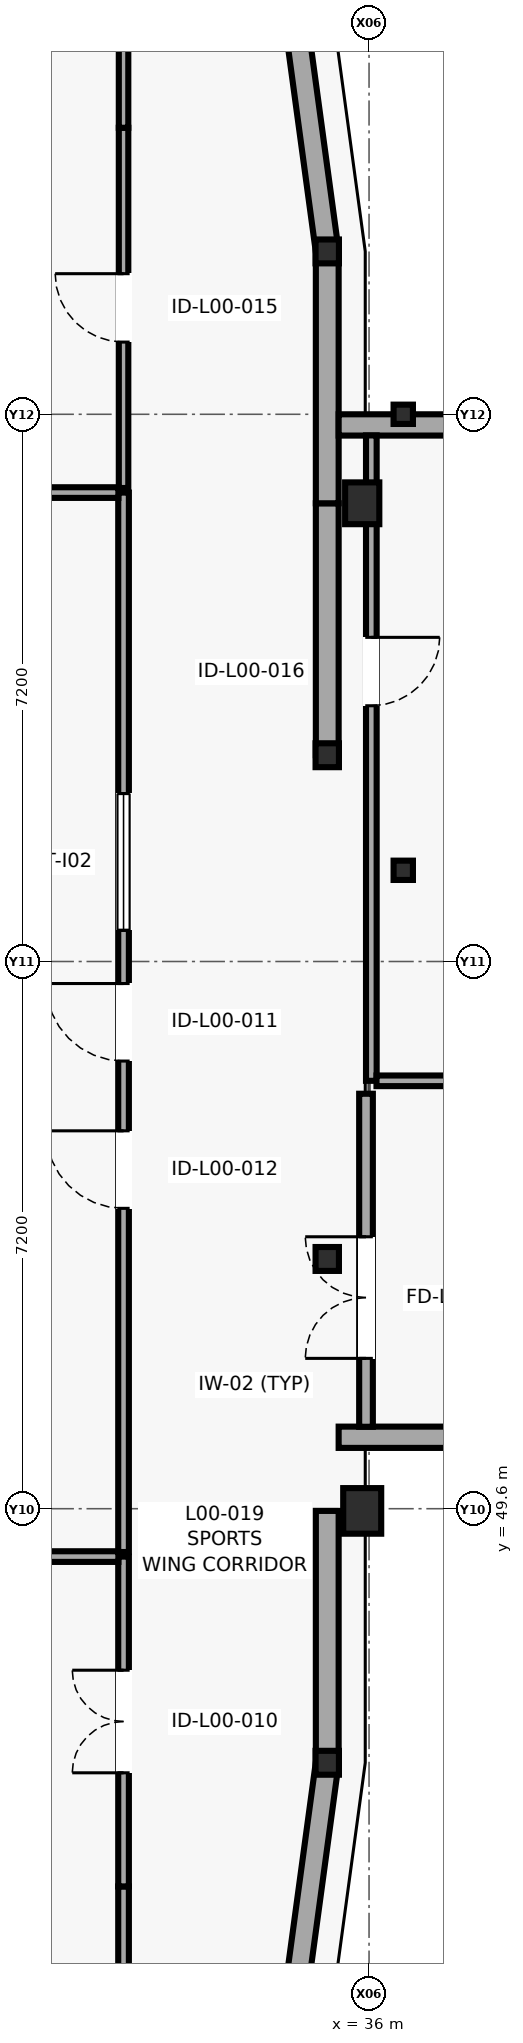
"""IFC4 building model, lengths in metres.
Left out: names, types, materials, properties, quantities, classifications, styles, units other than length and angle.
Written with IfcOpenShell. Run it as: python <this file> out.ifc"""

import sys

from ifc_helpers import new_model, si_unit, direction, frame, frame_2d, origin, origin_2d, place, context, subcontext, project, spatial, rectangle, i_section, extrude, element, fill, save


model = new_model("IFC4")
c1 = context("Model", 3, precision=1e-05, world=origin(), true_north=direction((0.0, 1.0)))
c2 = subcontext(c1, "Body", "Model", "MODEL_VIEW")
j1 = project(units=[si_unit("LENGTHUNIT", "METRE"), si_unit("PLANEANGLEUNIT", "RADIAN")], contexts=[c1])
p1 = place(None, origin())
s1 = spatial("IfcSite", under=j1, at=p1, CompositionType="ELEMENT")
p2 = place(p1, origin())
s2 = spatial("IfcBuilding", under=s1, at=p2, CompositionType="ELEMENT")
p3 = place(p2, origin())
s3 = spatial("IfcBuildingStorey", under=s2, at=p3, CompositionType="ELEMENT", Elevation=0.0)
for number, where, z_axis, x_axis in (
    (1, (35.45, 46.257, 0.0), (0.0, 0.0, 1.0), (1.0, 0.0, 0.0)),
    (2, (35.45, 52.886, 0.0), (0.0, 0.0, 1.0), (1.0, 0.0, 0.0)),
    (3, (35.45, 59.514, 0.0), (0.0, 0.0, 1.0), (1.0, 0.0, 0.0)),
    (4, (35.45, 66.143, 0.0), (0.0, 0.0, 1.0), (1.0, 0.0, 0.0)),
):
    element("IfcColumn", number, at=place(p3, frame(where, z_axis=z_axis, x_axis=x_axis)), inside=s3, PredefinedType="COLUMN", context=c2, shape_type="SweptSolid", body=[
        extrude(i_section(OverallWidth=0.307, OverallDepth=0.314, WebThickness=0.012, FlangeThickness=0.019, FilletRadius=0.015, at=origin_2d()), origin(), (0.0, 0.0, 1.0), 4.2),
    ])
p4 = place(p3, frame((35.91, 49.571, 0.0), z_axis=(0.0, 0.0, 1.0), x_axis=(1.0, 0.0, 0.0)))
e5 = element("IfcColumn", 5, at=p4, inside=s3, PredefinedType="PILASTER", context=c2, shape_type="SweptSolid", body=[
    extrude(rectangle(XDim=0.5, YDim=0.6, at=origin_2d()), origin(), (0.0, 0.0, 1.0), 4.2),
])
p5 = place(p3, frame((35.91, 62.829, 0.0), z_axis=(0.0, 0.0, 1.0), x_axis=(1.0, 0.0, 0.0)))
e6 = element("IfcColumn", 6, at=p5, inside=s3, PredefinedType="PILASTER", context=c2, shape_type="SweptSolid", body=[
    extrude(rectangle(XDim=0.45, YDim=0.55, at=origin_2d()), origin(), (0.0, 0.0, 1.0), 4.2),
])
for number, where, z_axis, x_axis in (
    (7, (36.45, 58.0, 0.0), (0.0, 0.0, 1.0), (1.0, 0.0, 0.0)),
    (8, (36.45, 64.0, 0.0), (0.0, 0.0, 1.0), (1.0, 0.0, 0.0)),
):
    element("IfcColumn", number, at=place(p3, frame(where, z_axis=z_axis, x_axis=x_axis)), inside=s3, PredefinedType="COLUMN", context=c2, shape_type="SweptSolid", body=[
        extrude(i_section(OverallWidth=0.255, OverallDepth=0.254, WebThickness=0.009, FlangeThickness=0.014, FilletRadius=0.013, at=origin_2d()), origin(), (0.0, 0.0, 1.0), 4.2),
    ])
p6 = place(p3, frame((35.0, 42.943, 0.0), z_axis=(0.0, 0.0, 1.0), x_axis=(0.134539839792, 0.990908185206, 0.0)))
e9 = element("IfcWall", 9, at=p6, inside=s3, PredefinedType="SOLIDWALL", context=c2, shape_type="SweptSolid", body=[
    extrude(rectangle(XDim=3.344, YDim=0.3, at=frame_2d((1.672, 0.0))), origin(), (0.0, 0.0, 1.0), 3.68),
])
p7 = place(p3, frame((35.45, 46.257, 0.0), z_axis=(0.0, 0.0, 1.0), x_axis=(0.0, 1.0, 0.0)))
e10 = element("IfcWall", 10, at=p7, inside=s3, PredefinedType="SOLIDWALL", context=c2, shape_type="SweptSolid", body=[
    extrude(rectangle(XDim=3.314, YDim=0.3, at=frame_2d((1.657, 0.0))), origin(), (0.0, 0.0, 1.0), 3.68),
])
p8 = place(p3, frame((35.45, 59.514, 0.0), z_axis=(0.0, 0.0, 1.0), x_axis=(0.0, 1.0, 0.0)))
e11 = element("IfcWall", 11, at=p8, inside=s3, PredefinedType="SOLIDWALL", context=c2, shape_type="SweptSolid", body=[
    extrude(rectangle(XDim=3.315, YDim=0.3, at=frame_2d((1.658, 0.0))), origin(), (0.0, 0.0, 1.0), 3.68),
])
p9 = place(p3, frame((35.45, 62.829, 0.0), z_axis=(0.0, 0.0, 1.0), x_axis=(0.0, 1.0, 0.0)))
e12 = element("IfcWall", 12, at=p9, inside=s3, PredefinedType="SOLIDWALL", context=c2, shape_type="SweptSolid", body=[
    extrude(rectangle(XDim=3.314, YDim=0.3, at=frame_2d((1.657, 0.0))), origin(), (0.0, 0.0, 1.0), 3.68),
])
p10 = place(p3, frame((35.45, 66.143, 0.0), z_axis=(0.0, 0.0, 1.0), x_axis=(-0.134539839792, 0.990908185206, 0.0)))
e13 = element("IfcWall", 13, at=p10, inside=s3, PredefinedType="SOLIDWALL", context=c2, shape_type="SweptSolid", body=[
    extrude(rectangle(XDim=3.344, YDim=0.3, at=frame_2d((1.672, 0.0))), origin(), (0.0, 0.0, 1.0), 3.68),
])
p11 = place(p3, frame((43.48, 63.86, 0.0), z_axis=(0.0, 0.0, 1.0), x_axis=(-1.0, 0.0, 0.0)))
e14 = element("IfcWall", 14, at=p11, inside=s3, PredefinedType="SOLIDWALL", context=c2, shape_type="SweptSolid", body=[
    extrude(rectangle(XDim=7.88, YDim=0.28, at=frame_2d((3.94, 0.0))), origin(), (0.0, 0.0, 1.0), 3.075),
])
p12 = place(p11, frame((1.12, 0.0, 0.85)))
e15 = element("IfcOpeningElement", 15, at=p12, cuts=e14, PredefinedType="OPENING", context=c2, shape_type="SweptSolid", body=[
    extrude(rectangle(XDim=1.7, YDim=1.75, at=frame_2d((0.85, 0.875))), frame((0.0, 0.15, 0.0), z_axis=(0.0, -1.0, 0.0), x_axis=(1.0, 0.0, 0.0)), (0.0, 0.0, 1.0), 0.3),
])
p13 = place(p11, frame((4.51, 0.0, 0.85)))
e16 = element("IfcOpeningElement", 16, at=p13, cuts=e14, PredefinedType="OPENING", context=c2, shape_type="SweptSolid", body=[
    extrude(rectangle(XDim=1.9, YDim=1.65, at=frame_2d((0.95, 0.825))), frame((0.0, 0.15, 0.0), z_axis=(0.0, -1.0, 0.0), x_axis=(1.0, 0.0, 0.0)), (0.0, 0.0, 1.0), 0.3),
])
p14 = place(p3, frame((35.6, 50.54, 0.0), z_axis=(0.0, 0.0, 1.0), x_axis=(1.0, 0.0, 0.0)))
e17 = element("IfcWall", 17, at=p14, inside=s3, PredefinedType="SOLIDWALL", context=c2, shape_type="SweptSolid", body=[
    extrude(rectangle(XDim=7.88, YDim=0.28, at=frame_2d((3.94, 0.0))), origin(), (0.0, 0.0, 1.0), 3.98),
])
p15 = place(p14, frame((3.25, 0.0, 0.0)))
e18 = element("IfcOpeningElement", 18, at=p15, cuts=e17, PredefinedType="OPENING", context=c2, shape_type="SweptSolid", body=[
    extrude(rectangle(XDim=1.5, YDim=2.2, at=frame_2d((0.75, 1.1))), frame((0.0, 0.15, 0.0), z_axis=(0.0, -1.0, 0.0), x_axis=(1.0, 0.0, 0.0)), (0.0, 0.0, 1.0), 0.3),
])
p16 = place(p14, frame((1.42, 0.0, 0.75)))
e19 = element("IfcOpeningElement", 19, at=p16, cuts=e17, PredefinedType="OPENING", context=c2, shape_type="SweptSolid", body=[
    extrude(rectangle(XDim=1.1, YDim=2.1, at=frame_2d((0.55, 1.05))), frame((0.0, 0.15, 0.0), z_axis=(0.0, -1.0, 0.0), x_axis=(1.0, 0.0, 0.0)), (0.0, 0.0, 1.0), 0.3),
])
p17 = place(p14, frame((5.36, 0.0, 0.75)))
e20 = element("IfcOpeningElement", 20, at=p17, cuts=e17, PredefinedType="OPENING", context=c2, shape_type="SweptSolid", body=[
    extrude(rectangle(XDim=1.1, YDim=2.1, at=frame_2d((0.55, 1.05))), frame((0.0, 0.15, 0.0), z_axis=(0.0, -1.0, 0.0), x_axis=(1.0, 0.0, 0.0)), (0.0, 0.0, 1.0), 0.3),
])
p18 = place(p3, frame((35.96, 50.678, 0.0), z_axis=(0.0, 0.0, 1.0), x_axis=(0.0, 1.0, 0.0)))
e21 = element("IfcWall", 21, at=p18, inside=s3, PredefinedType="PARTITIONING", context=c2, shape_type="SweptSolid", body=[
    extrude(rectangle(XDim=4.382, YDim=0.18, at=frame_2d((2.191, 0.0))), origin(), (0.0, 0.0, 1.0), 3.98),
])
p19 = place(p18, frame((0.9, 0.0, 0.0)))
e22 = element("IfcOpeningElement", 22, at=p19, cuts=e21, PredefinedType="OPENING", context=c2, shape_type="SweptSolid", body=[
    extrude(rectangle(XDim=1.6, YDim=2.25, at=frame_2d((0.8, 1.125))), frame((0.0, 0.1, 0.0), z_axis=(0.0, -1.0, 0.0), x_axis=(1.0, 0.0, 0.0)), (0.0, 0.0, 1.0), 0.2),
])
p20 = place(p3, frame((32.77, 35.966, 0.0), z_axis=(0.0, 0.0, 1.0), x_axis=(0.0, 1.0, 0.0)))
e23 = element("IfcWall", 23, at=p20, inside=s3, PredefinedType="PARTITIONING", context=c2, shape_type="SweptSolid", body=[
    extrude(rectangle(XDim=8.664, YDim=0.14, at=frame_2d((4.332, 0.0))), origin(), (0.0, 0.0, 1.0), 3.93),
])
p21 = place(p3, frame((32.77, 44.63, 0.0), z_axis=(0.0, 0.0, 1.0), x_axis=(0.0, 1.0, 0.0)))
e24 = element("IfcWall", 24, at=p21, inside=s3, PredefinedType="PARTITIONING", context=c2, shape_type="SweptSolid", body=[
    extrude(rectangle(XDim=4.34, YDim=0.14, at=frame_2d((2.17, 0.0))), origin(), (0.0, 0.0, 1.0), 3.93),
])
p22 = place(p21, frame((1.495, 0.0, 0.0)))
e25 = element("IfcOpeningElement", 25, at=p22, cuts=e24, PredefinedType="OPENING", context=c2, shape_type="SweptSolid", body=[
    extrude(rectangle(XDim=1.35, YDim=2.25, at=frame_2d((0.675, 1.125))), frame((0.0, 0.08, 0.0), z_axis=(0.0, -1.0, 0.0), x_axis=(1.0, 0.0, 0.0)), (0.0, 0.0, 1.0), 0.16),
])
p23 = place(p3, frame((32.702, 48.97, 0.0), z_axis=(0.0, 0.0, 1.0), x_axis=(-1.0, 0.0, 0.0)))
e26 = element("IfcWall", 26, at=p23, inside=s3, PredefinedType="PARTITIONING", context=c2, shape_type="SweptSolid", body=[
    extrude(rectangle(XDim=29.481, YDim=0.14, at=frame_2d((14.74, 0.0))), origin(), (0.0, 0.0, 1.0), 3.93),
])
p24 = place(p3, frame((32.77, 49.03, 0.0), z_axis=(0.0, 0.0, 1.0), x_axis=(0.0, 1.0, 0.0)))
e27 = element("IfcWall", 27, at=p24, inside=s3, PredefinedType="PARTITIONING", context=c2, shape_type="SweptSolid", body=[
    extrude(rectangle(XDim=13.94, YDim=0.14, at=frame_2d((6.97, 0.0))), origin(), (0.0, 0.0, 1.0), 3.93),
])
p25 = place(p24, frame((6.46, 0.0, 0.0)))
e28 = element("IfcOpeningElement", 28, at=p25, cuts=e27, PredefinedType="OPENING", context=c2, shape_type="SweptSolid", body=[
    extrude(rectangle(XDim=1.02, YDim=2.14, at=frame_2d((0.51, 1.07))), frame((0.0, 0.08, 0.0), z_axis=(0.0, -1.0, 0.0), x_axis=(1.0, 0.0, 0.0)), (0.0, 0.0, 1.0), 0.16),
])
p26 = place(p24, frame((4.522, 0.0, 0.0)))
e29 = element("IfcOpeningElement", 29, at=p26, cuts=e27, PredefinedType="OPENING", context=c2, shape_type="SweptSolid", body=[
    extrude(rectangle(XDim=1.02, YDim=2.14, at=frame_2d((0.51, 1.07))), frame((0.0, 0.08, 0.0), z_axis=(0.0, -1.0, 0.0), x_axis=(1.0, 0.0, 0.0)), (0.0, 0.0, 1.0), 0.16),
])
p27 = place(p24, frame((8.18, 0.0, 1.05)))
e30 = element("IfcOpeningElement", 30, at=p27, cuts=e27, PredefinedType="OPENING", context=c2, shape_type="SweptSolid", body=[
    extrude(rectangle(XDim=1.8, YDim=1.2, at=frame_2d((0.9, 0.6))), frame((0.0, 0.08, 0.0), z_axis=(0.0, -1.0, 0.0), x_axis=(1.0, 0.0, 0.0)), (0.0, 0.0, 1.0), 0.16),
])
p28 = place(p3, frame((32.702, 62.97, 0.0), z_axis=(0.0, 0.0, 1.0), x_axis=(-1.0, 0.0, 0.0)))
e31 = element("IfcWall", 31, at=p28, inside=s3, PredefinedType="PARTITIONING", context=c2, shape_type="SweptSolid", body=[
    extrude(rectangle(XDim=29.555, YDim=0.14, at=frame_2d((14.777, 0.0))), origin(), (0.0, 0.0, 1.0), 3.93),
])
p29 = place(p28, frame((14.328, 0.0, 0.0)))
e32 = element("IfcOpeningElement", 32, at=p29, cuts=e31, PredefinedType="OPENING", context=c2, shape_type="SweptSolid", body=[
    extrude(rectangle(XDim=0.9, YDim=2.1, at=frame_2d((0.45, 1.05))), frame((0.0, 0.08, 0.0), z_axis=(0.0, -1.0, 0.0), x_axis=(1.0, 0.0, 0.0)), (0.0, 0.0, 1.0), 0.16),
])
p30 = place(p28, frame((10.029, 0.0, 0.0)))
e33 = element("IfcOpeningElement", 33, at=p30, cuts=e31, PredefinedType="OPENING", context=c2, shape_type="SweptSolid", body=[
    extrude(rectangle(XDim=0.9, YDim=2.1, at=frame_2d((0.45, 1.05))), frame((0.0, 0.08, 0.0), z_axis=(0.0, -1.0, 0.0), x_axis=(1.0, 0.0, 0.0)), (0.0, 0.0, 1.0), 0.16),
])
p31 = place(p28, frame((15.928, 0.0, 1.05)))
e34 = element("IfcOpeningElement", 34, at=p31, cuts=e31, PredefinedType="OPENING", context=c2, shape_type="SweptSolid", body=[
    extrude(rectangle(XDim=1.6, YDim=1.1, at=frame_2d((0.8, 0.55))), frame((0.0, 0.08, 0.0), z_axis=(0.0, -1.0, 0.0), x_axis=(1.0, 0.0, 0.0)), (0.0, 0.0, 1.0), 0.16),
])
p32 = place(p3, frame((32.77, 63.03, 0.0), z_axis=(0.0, 0.0, 1.0), x_axis=(0.0, 1.0, 0.0)))
e35 = element("IfcWall", 35, at=p32, inside=s3, PredefinedType="PARTITIONING", context=c2, shape_type="SweptSolid", body=[
    extrude(rectangle(XDim=4.74, YDim=0.125, at=frame_2d((2.37, 0.0))), origin(), (0.0, 0.0, 1.0), 3.93),
])
p33 = place(p32, frame((1.92, 0.0, 0.0)))
e36 = element("IfcOpeningElement", 36, at=p33, cuts=e35, PredefinedType="OPENING", context=c2, shape_type="SweptSolid", body=[
    extrude(rectangle(XDim=0.9, YDim=2.1, at=frame_2d((0.45, 1.05))), frame((0.0, 0.073, 0.0), z_axis=(0.0, -1.0, 0.0), x_axis=(1.0, 0.0, 0.0)), (0.0, 0.0, 1.0), 0.145),
])
p34 = place(p3, frame((32.77, 67.77, 0.0), z_axis=(0.0, 0.0, 1.0), x_axis=(0.0, 1.0, 0.0)))
e37 = element("IfcWall", 37, at=p34, inside=s3, PredefinedType="PARTITIONING", context=c2, shape_type="SweptSolid", body=[
    extrude(rectangle(XDim=8.664, YDim=0.125, at=frame_2d((4.332, 0.0))), origin(), (0.0, 0.0, 1.0), 3.93),
])
p35 = place(p3, frame((36.03, 63.722, 0.0), z_axis=(0.0, 0.0, 1.0), x_axis=(0.0, -1.0, 0.0)))
e38 = element("IfcWall", 38, at=p35, inside=s3, PredefinedType="PARTITIONING", context=c2, shape_type="SweptSolid", body=[
    extrude(rectangle(XDim=8.492, YDim=0.14, at=frame_2d((4.246, 0.0))), origin(), (0.0, 0.0, 1.0), 3.975),
])
p36 = place(p35, frame((2.657, 0.0, 0.0)))
e39 = element("IfcOpeningElement", 39, at=p36, cuts=e38, PredefinedType="OPENING", context=c2, shape_type="SweptSolid", body=[
    extrude(rectangle(XDim=0.9, YDim=2.02, at=frame_2d((0.45, 1.01))), frame((0.0, 0.08, 0.0), z_axis=(0.0, -1.0, 0.0), x_axis=(1.0, 0.0, 0.0)), (0.0, 0.0, 1.0), 0.16),
])
p37 = place(p3, frame((36.098, 55.23, 0.0), z_axis=(0.0, 0.0, 1.0), x_axis=(1.0, 0.0, 0.0)))
e40 = element("IfcWall", 40, at=p37, inside=s3, PredefinedType="PARTITIONING", context=c2, shape_type="SweptSolid", body=[
    extrude(rectangle(XDim=7.072, YDim=0.14, at=frame_2d((3.536, 0.0))), origin(), (0.0, 0.0, 1.0), 3.975),
])
p38 = place(p19, origin())
e41 = element("IfcDoor", 41, at=p38, inside=s3, OperationType="DOUBLE_DOOR_SINGLE_SWING", PredefinedType="DOOR", context=c2, shape_type="SweptSolid", body=[
    extrude(rectangle(XDim=1.6, YDim=2.25, at=frame_2d((0.8, 1.125))), frame((0.0, 0.025, 0.0), z_axis=(0.0, -1.0, 0.0), x_axis=(1.0, 0.0, 0.0)), (0.0, 0.0, 1.0), 0.05),
])
fill(e22, e41)
p39 = place(p22, origin())
e42 = element("IfcDoor", 42, at=p39, inside=s3, OperationType="DOUBLE_DOOR_SINGLE_SWING", PredefinedType="DOOR", context=c2, shape_type="SweptSolid", body=[
    extrude(rectangle(XDim=1.35, YDim=2.25, at=frame_2d((0.675, 1.125))), frame((0.0, 0.025, 0.0), z_axis=(0.0, -1.0, 0.0), x_axis=(1.0, 0.0, 0.0)), (0.0, 0.0, 1.0), 0.05),
])
fill(e25, e42)
p40 = place(p25, origin())
e43 = element("IfcDoor", 43, at=p40, inside=s3, OperationType="SINGLE_SWING_RIGHT", PredefinedType="DOOR", context=c2, shape_type="SweptSolid", body=[
    extrude(rectangle(XDim=1.02, YDim=2.14, at=frame_2d((0.51, 1.07))), frame((0.0, 0.025, 0.0), z_axis=(0.0, -1.0, 0.0), x_axis=(1.0, 0.0, 0.0)), (0.0, 0.0, 1.0), 0.05),
])
fill(e28, e43)
p41 = place(p26, origin())
e44 = element("IfcDoor", 44, at=p41, inside=s3, OperationType="SINGLE_SWING_RIGHT", PredefinedType="DOOR", context=c2, shape_type="SweptSolid", body=[
    extrude(rectangle(XDim=1.02, YDim=2.14, at=frame_2d((0.51, 1.07))), frame((0.0, 0.025, 0.0), z_axis=(0.0, -1.0, 0.0), x_axis=(1.0, 0.0, 0.0)), (0.0, 0.0, 1.0), 0.05),
])
fill(e29, e44)
p42 = place(p27, origin())
e45 = element("IfcWindow", 45, at=p42, inside=s3, PartitioningType="SINGLE_PANEL", PredefinedType="WINDOW", context=c2, shape_type="SweptSolid", body=[
    extrude(rectangle(XDim=1.8, YDim=1.2, at=frame_2d((0.9, 0.6))), frame((0.0, 0.03, 0.0), z_axis=(0.0, -1.0, 0.0), x_axis=(1.0, 0.0, 0.0)), (0.0, 0.0, 1.0), 0.06),
])
fill(e30, e45)
p43 = place(p33, origin())
e46 = element("IfcDoor", 46, at=p43, inside=s3, OperationType="SINGLE_SWING_RIGHT", PredefinedType="DOOR", context=c2, shape_type="SweptSolid", body=[
    extrude(rectangle(XDim=0.9, YDim=2.1, at=frame_2d((0.45, 1.05))), frame((0.0, 0.025, 0.0), z_axis=(0.0, -1.0, 0.0), x_axis=(1.0, 0.0, 0.0)), (0.0, 0.0, 1.0), 0.05),
])
fill(e36, e46)
p44 = place(p36, origin())
e47 = element("IfcDoor", 47, at=p44, inside=s3, OperationType="SINGLE_SWING_LEFT", PredefinedType="DOOR", context=c2, shape_type="SweptSolid", body=[
    extrude(rectangle(XDim=0.9, YDim=2.02, at=frame_2d((0.45, 1.01))), frame((0.0, 0.025, 0.0), z_axis=(0.0, -1.0, 0.0), x_axis=(1.0, 0.0, 0.0)), (0.0, 0.0, 1.0), 0.05),
])
fill(e39, e47)
save(model, sys.argv[1])
